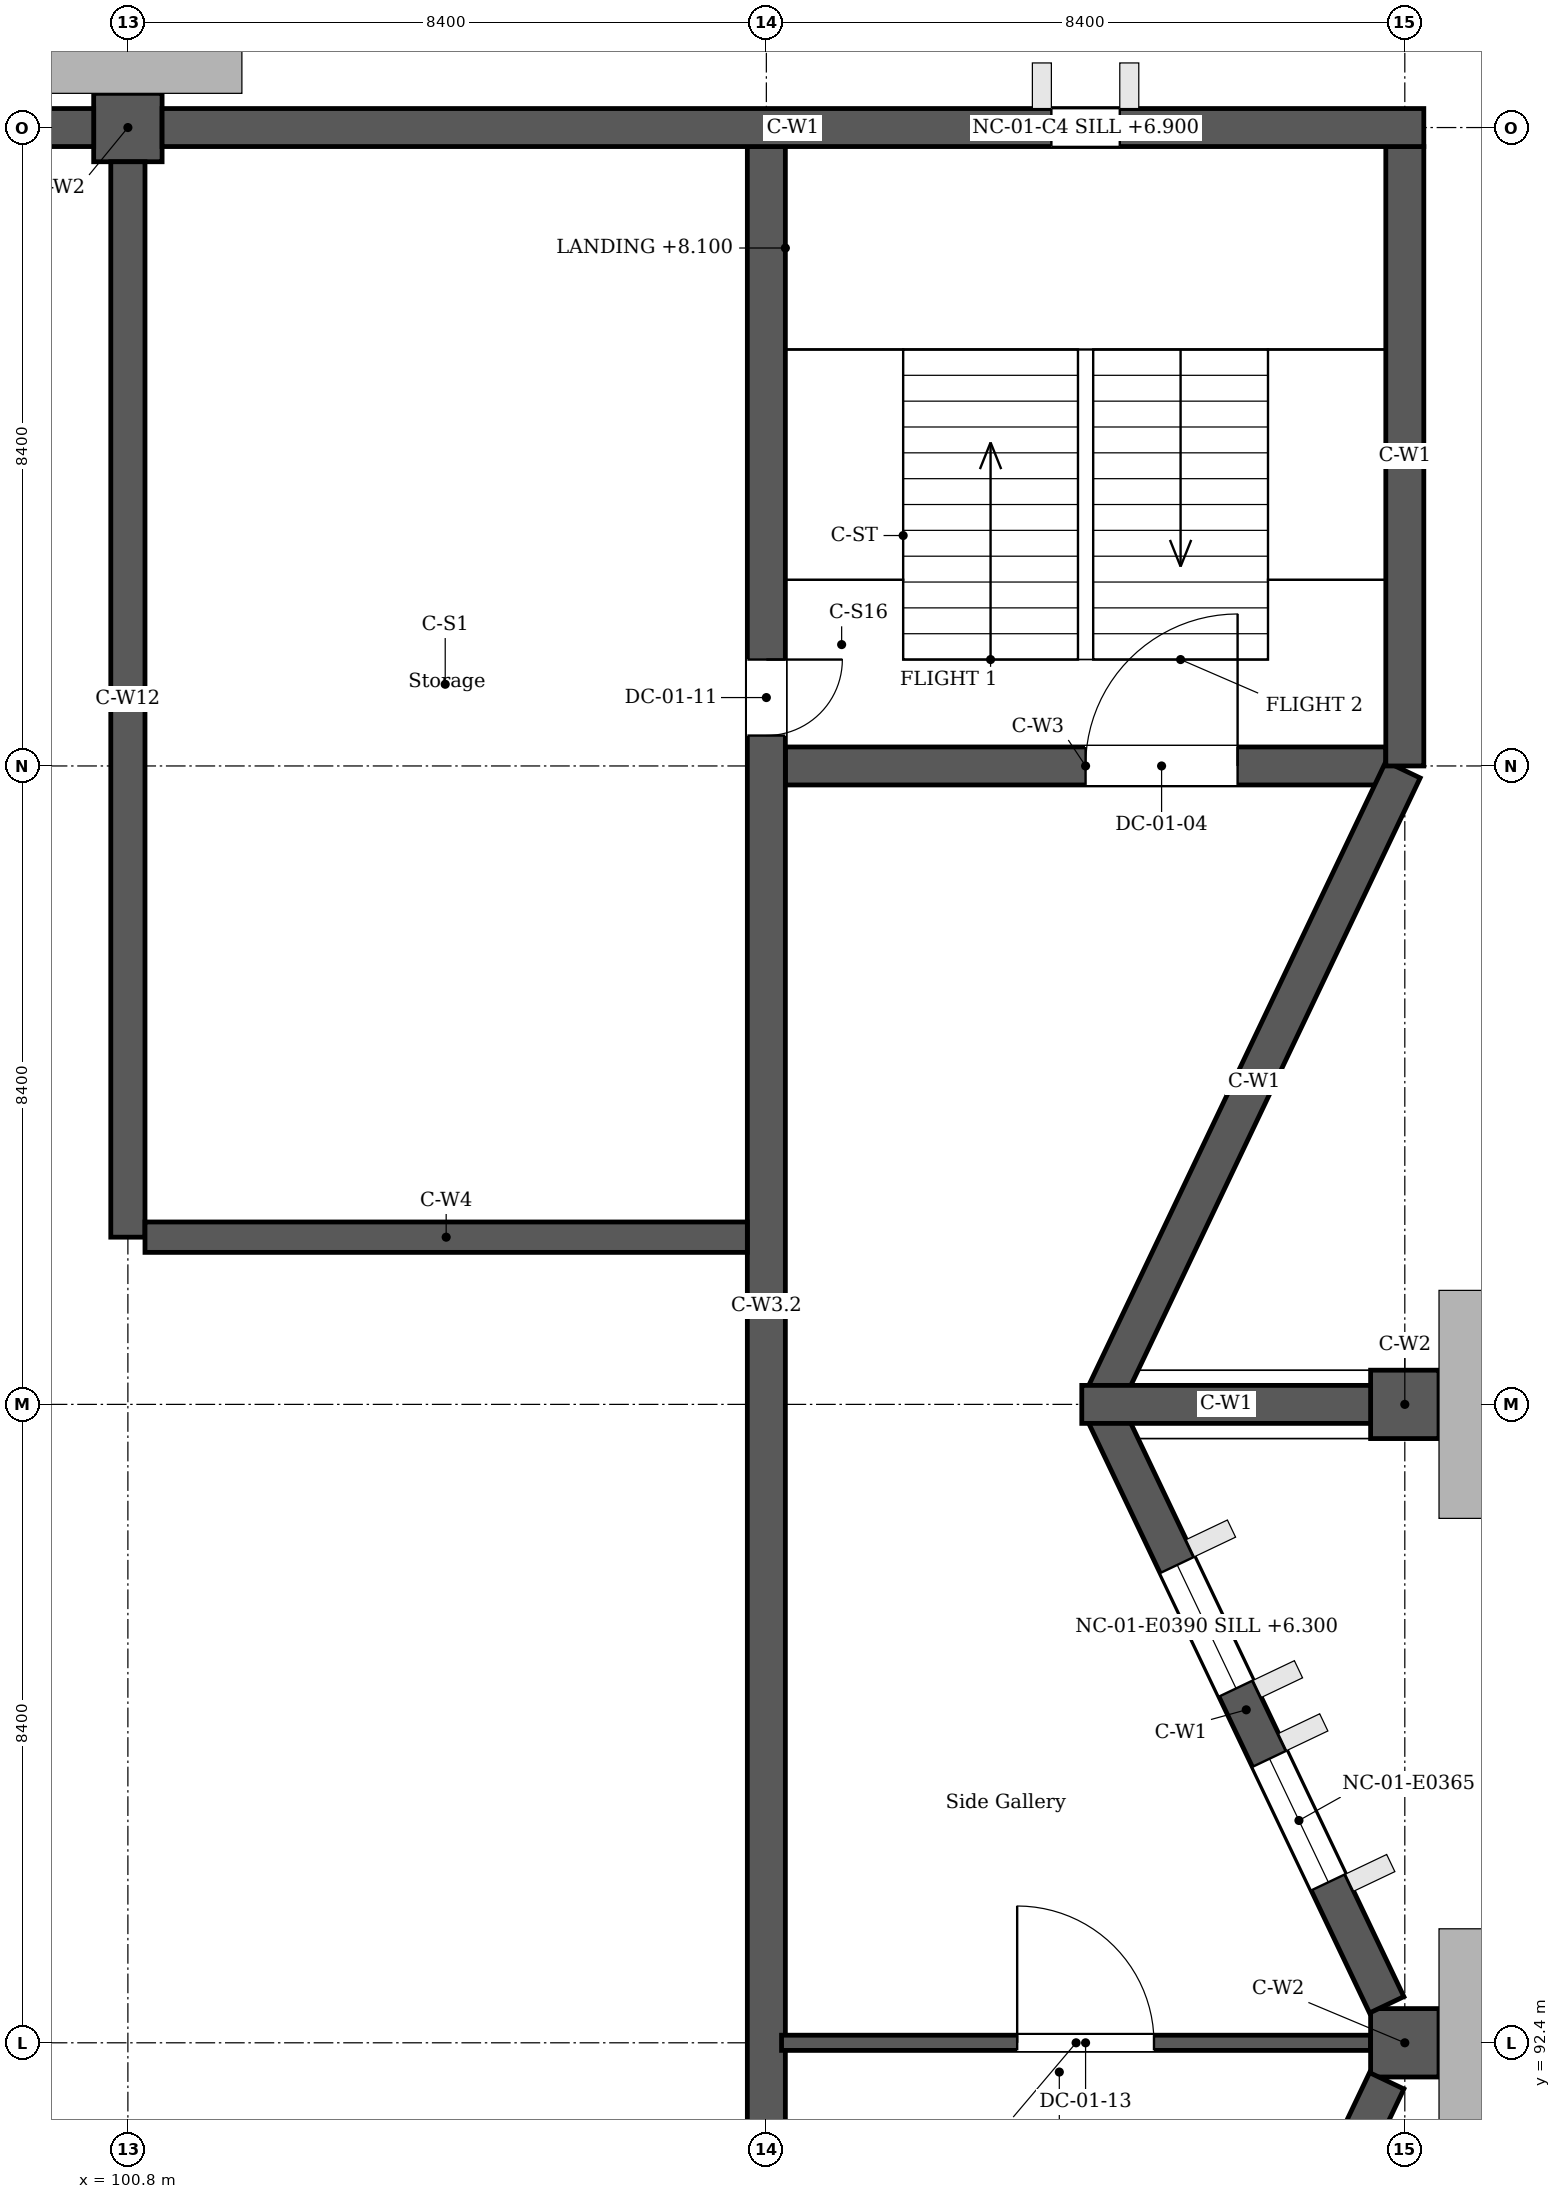
"""IFC4 building model, lengths in metres.
Left out: names, types, materials, properties, quantities, classifications, styles, units other than length and angle.
Written with IfcOpenShell. Run it as: python <this file> out.ifc"""

import sys

from ifc_helpers import new_model, si_unit, direction, frame, frame_2d, origin, place, context, subcontext, project, spatial, rectangle, extrude, element, fill, save


model = new_model("IFC4")
c1 = context("Model", 3, precision=1e-05, world=origin(), true_north=direction((0.0, 1.0)))
c2 = subcontext(c1, "Body", "Model", "MODEL_VIEW")
j1 = project(units=[si_unit("LENGTHUNIT", "METRE"), si_unit("PLANEANGLEUNIT", "RADIAN")], contexts=[c1])
p1 = place(None, origin())
s1 = spatial("IfcSite", under=j1, at=p1, CompositionType="ELEMENT")
p2 = place(p1, origin())
s2 = spatial("IfcBuilding", under=s1, at=p2, CompositionType="ELEMENT")
p3 = place(p2, frame((0.0, 0.0, 6.0)))
s3 = spatial("IfcBuildingStorey", under=s2, at=p3, CompositionType="ELEMENT", Elevation=6.0)
p4 = place(p3, frame((117.362, 91.9, 0.0), z_axis=(0.0, 0.0, 1.0), x_axis=(-0.429922557701, -0.902865767642, 0.0)))
e1 = element("IfcWall", 1, at=p4, inside=s3, PredefinedType="SOLIDWALL", context=c2, shape_type="SweptSolid", body=[
    extrude(rectangle(XDim=8.598, YDim=0.5, at=frame_2d((4.299, 0.0))), origin(), (0.0, 0.0, 1.0), 4.2),
])
p5 = place(p4, frame((4.61, 0.0, 0.3)))
e2 = element("IfcOpeningElement", 2, at=p5, cuts=e1, PredefinedType="OPENING", context=c2, shape_type="SweptSolid", body=[
    extrude(rectangle(XDim=1.8, YDim=3.6, at=frame_2d((0.9, 1.8))), frame((0.0, 0.26, 0.0), z_axis=(0.0, -1.0, 0.0), x_axis=(1.0, 0.0, 0.0)), (0.0, 0.0, 1.0), 0.52),
])
p6 = place(p4, frame((1.786, 0.0, 0.3)))
e3 = element("IfcOpeningElement", 3, at=p6, cuts=e1, PredefinedType="OPENING", context=c2, shape_type="SweptSolid", body=[
    extrude(rectangle(XDim=1.8, YDim=3.6, at=frame_2d((0.9, 1.8))), frame((0.0, 0.26, 0.0), z_axis=(0.0, -1.0, 0.0), x_axis=(1.0, 0.0, 0.0)), (0.0, 0.0, 1.0), 0.52),
])
p7 = place(p3, frame((113.666, 100.663, 0.0), z_axis=(0.0, 0.0, 1.0), x_axis=(0.429911535511, -0.902871016057, 0.0)))
e4 = element("IfcWall", 4, at=p7, inside=s3, PredefinedType="SOLIDWALL", context=c2, shape_type="SweptSolid", body=[
    extrude(rectangle(XDim=8.598, YDim=0.5, at=frame_2d((4.299, 0.0))), origin(), (0.0, 0.0, 1.0), 4.2),
])
p8 = place(p7, frame((5.012, 0.0, 0.3)))
e5 = element("IfcOpeningElement", 5, at=p8, cuts=e4, PredefinedType="OPENING", context=c2, shape_type="SweptSolid", body=[
    extrude(rectangle(XDim=1.8, YDim=3.6, at=frame_2d((0.9, 1.8))), frame((0.0, 0.26, 0.0), z_axis=(0.0, -1.0, 0.0), x_axis=(1.0, 0.0, 0.0)), (0.0, 0.0, 1.0), 0.52),
])
p9 = place(p7, frame((2.188, 0.0, 0.3)))
e6 = element("IfcOpeningElement", 6, at=p9, cuts=e4, PredefinedType="OPENING", context=c2, shape_type="SweptSolid", body=[
    extrude(rectangle(XDim=1.8, YDim=3.6, at=frame_2d((0.9, 1.8))), frame((0.0, 0.26, 0.0), z_axis=(0.0, -1.0, 0.0), x_axis=(1.0, 0.0, 0.0)), (0.0, 0.0, 1.0), 0.52),
])
p10 = place(p3, frame((117.576, 109.15, 0.0), z_axis=(0.0, 0.0, 1.0), x_axis=(-0.429931496654, -0.902861511077, 0.0)))
e7 = element("IfcWall", 7, at=p10, inside=s3, PredefinedType="SOLIDWALL", context=c2, shape_type="SweptSolid", body=[
    extrude(rectangle(XDim=9.096, YDim=0.5, at=frame_2d((4.548, 0.0))), origin(), (0.0, 0.0, 1.0), 4.2),
])
p11 = place(p3, frame((117.6, 117.35, 0.0), z_axis=(0.0, 0.0, 1.0), x_axis=(0.0, -1.0, 0.0)))
e8 = element("IfcWall", 8, at=p11, inside=s3, PredefinedType="SOLIDWALL", context=c2, shape_type="SweptSolid", body=[
    extrude(rectangle(XDim=8.15, YDim=0.5, at=frame_2d((4.075, 0.0))), origin(), (0.0, 0.0, 1.0), 4.2),
])
p12 = place(p3, frame((113.35, 100.8, 0.0), z_axis=(0.0, 0.0, 1.0), x_axis=(1.0, 0.0, 0.0)))
e9 = element("IfcWall", 9, at=p12, inside=s3, PredefinedType="SOLIDWALL", context=c2, shape_type="SweptSolid", body=[
    extrude(rectangle(XDim=3.8, YDim=0.5, at=frame_2d((1.9, 0.0))), origin(), (0.0, 0.0, 1.0), 4.2),
])
p13 = place(p3, frame((117.6, 91.95, 0.0), z_axis=(0.0, 0.0, 1.0), x_axis=(0.0, 1.0, 0.0)))
e10 = element("IfcWall", 10, at=p13, inside=s3, PredefinedType="SOLIDWALL", context=c2, shape_type="SweptSolid", body=[
    extrude(rectangle(XDim=0.9, YDim=0.9, at=frame_2d((0.45, 0.0))), origin(), (0.0, 0.0, 1.0), 4.2),
])
p14 = place(p3, frame((117.6, 100.35, 0.0), z_axis=(0.0, 0.0, 1.0), x_axis=(0.0, 1.0, 0.0)))
e11 = element("IfcWall", 11, at=p14, inside=s3, PredefinedType="SOLIDWALL", context=c2, shape_type="SweptSolid", body=[
    extrude(rectangle(XDim=0.9, YDim=0.9, at=frame_2d((0.45, 0.0))), origin(), (0.0, 0.0, 1.0), 4.2),
])
p15 = place(p3, frame((101.25, 117.6, 0.0), z_axis=(0.0, 0.0, 1.0), x_axis=(1.0, 0.0, 0.0)))
e12 = element("IfcWall", 12, at=p15, inside=s3, PredefinedType="SOLIDWALL", context=c2, shape_type="SweptSolid", body=[
    extrude(rectangle(XDim=16.6, YDim=0.5, at=frame_2d((8.3, 0.0))), origin(), (0.0, 0.0, 1.0), 4.2),
])
p16 = place(p15, frame((11.7, 0.0, 0.9)))
e13 = element("IfcOpeningElement", 13, at=p16, cuts=e12, PredefinedType="OPENING", context=c2, shape_type="SweptSolid", body=[
    extrude(rectangle(XDim=0.9, YDim=2.4, at=frame_2d((0.45, 1.2))), frame((0.0, 0.26, 0.0), z_axis=(0.0, -1.0, 0.0), x_axis=(1.0, 0.0, 0.0)), (0.0, 0.0, 1.0), 0.52),
])
p17 = place(p3, frame((92.85, 117.6, 0.0), z_axis=(0.0, 0.0, 1.0), x_axis=(1.0, 0.0, 0.0)))
e14 = element("IfcWall", 14, at=p17, inside=s3, PredefinedType="SOLIDWALL", context=c2, shape_type="SweptSolid", body=[
    extrude(rectangle(XDim=7.5, YDim=0.5, at=frame_2d((3.75, 0.0))), origin(), (0.0, 0.0, 1.0), 4.2),
])
p18 = place(p3, frame((101.25, 117.6, 0.0), z_axis=(0.0, 0.0, 1.0), x_axis=(-1.0, 0.0, 0.0)))
e15 = element("IfcWall", 15, at=p18, inside=s3, PredefinedType="SOLIDWALL", context=c2, shape_type="SweptSolid", body=[
    extrude(rectangle(XDim=0.9, YDim=0.9, at=frame_2d((0.45, 0.0))), origin(), (0.0, 0.0, 1.0), 4.2),
])
p19 = place(p3, frame((109.2, 117.35, 0.0), z_axis=(0.0, 0.0, 1.0), x_axis=(0.0, -1.0, 0.0)))
e16 = element("IfcWall", 16, at=p19, inside=s3, PredefinedType="SOLIDWALL", context=c2, shape_type="SweptSolid", body=[
    extrude(rectangle(XDim=41.5, YDim=0.5, at=frame_2d((20.75, 0.0))), origin(), (0.0, 0.0, 1.0), 4.2),
])
p20 = place(p19, frame((6.75, 0.0, 0.0)))
e17 = element("IfcOpeningElement", 17, at=p20, cuts=e16, PredefinedType="OPENING", context=c2, shape_type="SweptSolid", body=[
    extrude(rectangle(XDim=1.0, YDim=2.1, at=frame_2d((0.5, 1.05))), frame((0.0, 0.26, 0.0), z_axis=(0.0, -1.0, 0.0), x_axis=(1.0, 0.0, 0.0)), (0.0, 0.0, 1.0), 0.52),
])
p21 = place(p3, frame((100.8, 103.0, 0.0), z_axis=(0.0, 0.0, 1.0), x_axis=(0.0, 1.0, 0.0)))
e18 = element("IfcWall", 18, at=p21, inside=s3, PredefinedType="SOLIDWALL", context=c2, shape_type="SweptSolid", body=[
    extrude(rectangle(XDim=14.15, YDim=0.45, at=frame_2d((7.075, 0.0))), origin(), (0.0, 0.0, 1.0), 4.2),
])
p22 = place(p3, frame((101.025, 103.0, 0.0), z_axis=(0.0, 0.0, 1.0), x_axis=(1.0, 0.0, 0.0)))
e19 = element("IfcWall", 19, at=p22, inside=s3, PredefinedType="SOLIDWALL", context=c2, shape_type="SweptSolid", body=[
    extrude(rectangle(XDim=7.925, YDim=0.4, at=frame_2d((3.962, 0.0))), origin(), (0.0, 0.0, 1.0), 4.2),
])
p23 = place(p3, frame((109.45, 109.2, 0.0), z_axis=(0.0, 0.0, 1.0), x_axis=(1.0, 0.0, 0.0)))
e20 = element("IfcWall", 20, at=p23, inside=s3, PredefinedType="SOLIDWALL", context=c2, shape_type="SweptSolid", body=[
    extrude(rectangle(XDim=7.9, YDim=0.5, at=frame_2d((3.95, 0.0))), origin(), (0.0, 0.0, 1.0), 4.2),
])
p24 = place(p23, frame((3.95, 0.0, 0.0)))
e21 = element("IfcOpeningElement", 21, at=p24, cuts=e20, PredefinedType="OPENING", context=c2, shape_type="SweptSolid", body=[
    extrude(rectangle(XDim=2.0, YDim=2.1, at=frame_2d((1.0, 1.05))), frame((0.0, 0.26, 0.0), z_axis=(0.0, -1.0, 0.0), x_axis=(1.0, 0.0, 0.0)), (0.0, 0.0, 1.0), 0.52),
])
p25 = place(p3, frame((109.4, 92.4, 0.0), z_axis=(0.0, 0.0, 1.0), x_axis=(1.0, 0.0, 0.0)))
e22 = element("IfcWall", 22, at=p25, inside=s3, PredefinedType="PARTITIONING", context=c2, shape_type="SweptSolid", body=[
    extrude(rectangle(XDim=7.75, YDim=0.2, at=frame_2d((3.875, 0.0))), origin(), (0.0, 0.0, 1.0), 4.2),
])
p26 = place(p25, frame((3.1, 0.0, 0.0)))
e23 = element("IfcOpeningElement", 23, at=p26, cuts=e22, PredefinedType="OPENING", context=c2, shape_type="SweptSolid", body=[
    extrude(rectangle(XDim=1.8, YDim=2.1, at=frame_2d((0.9, 1.05))), frame((0.0, 0.11, 0.0), z_axis=(0.0, -1.0, 0.0), x_axis=(1.0, 0.0, 0.0)), (0.0, 0.0, 1.0), 0.22),
])
p27 = place(p8, origin())
e24 = element("IfcWindow", 24, at=p27, inside=s3, PartitioningType="SINGLE_PANEL", PredefinedType="WINDOW", context=c2, shape_type="SweptSolid", body=[
    extrude(rectangle(XDim=1.8, YDim=3.6, at=frame_2d((0.9, 1.8))), frame((0.0, 0.03, 0.0), z_axis=(0.0, -1.0, 0.0), x_axis=(1.0, 0.0, 0.0)), (0.0, 0.0, 1.0), 0.06),
])
fill(e5, e24)
p28 = place(p9, origin())
e25 = element("IfcWindow", 25, at=p28, inside=s3, PartitioningType="SINGLE_PANEL", PredefinedType="WINDOW", context=c2, shape_type="SweptSolid", body=[
    extrude(rectangle(XDim=1.8, YDim=3.6, at=frame_2d((0.9, 1.8))), frame((0.0, 0.03, 0.0), z_axis=(0.0, -1.0, 0.0), x_axis=(1.0, 0.0, 0.0)), (0.0, 0.0, 1.0), 0.06),
])
fill(e6, e25)
p29 = place(p16, origin())
e26 = element("IfcWindow", 26, at=p29, inside=s3, PartitioningType="SINGLE_PANEL", PredefinedType="WINDOW", context=c2, shape_type="SweptSolid", body=[
    extrude(rectangle(XDim=0.9, YDim=2.4, at=frame_2d((0.45, 1.2))), frame((0.0, 0.03, 0.0), z_axis=(0.0, -1.0, 0.0), x_axis=(1.0, 0.0, 0.0)), (0.0, 0.0, 1.0), 0.06),
])
fill(e13, e26)
p30 = place(p24, origin())
e27 = element("IfcDoor", 27, at=p30, inside=s3, OperationType="DOUBLE_DOOR_DOUBLE_SWING", PredefinedType="DOOR", context=c2, shape_type="SweptSolid", body=[
    extrude(rectangle(XDim=2.0, YDim=2.1, at=frame_2d((1.0, 1.05))), frame((0.0, 0.025, 0.0), z_axis=(0.0, -1.0, 0.0), x_axis=(1.0, 0.0, 0.0)), (0.0, 0.0, 1.0), 0.05),
])
fill(e21, e27)
p31 = place(p26, origin())
e28 = element("IfcDoor", 28, at=p31, inside=s3, OperationType="DOUBLE_DOOR_DOUBLE_SWING", PredefinedType="DOOR", context=c2, shape_type="SweptSolid", body=[
    extrude(rectangle(XDim=1.8, YDim=2.1, at=frame_2d((0.9, 1.05))), frame((0.0, 0.025, 0.0), z_axis=(0.0, -1.0, 0.0), x_axis=(1.0, 0.0, 0.0)), (0.0, 0.0, 1.0), 0.05),
])
fill(e23, e28)
p32 = place(p20, origin())
e29 = element("IfcDoor", 29, at=p32, inside=s3, OperationType="SINGLE_SWING_LEFT", PredefinedType="DOOR", context=c2, shape_type="SweptSolid", body=[
    extrude(rectangle(XDim=1.0, YDim=2.1, at=frame_2d((0.5, 1.05))), frame((0.0, 0.025, 0.0), z_axis=(0.0, -1.0, 0.0), x_axis=(1.0, 0.0, 0.0)), (0.0, 0.0, 1.0), 0.05),
])
fill(e17, e29)
save(model, sys.argv[1])
